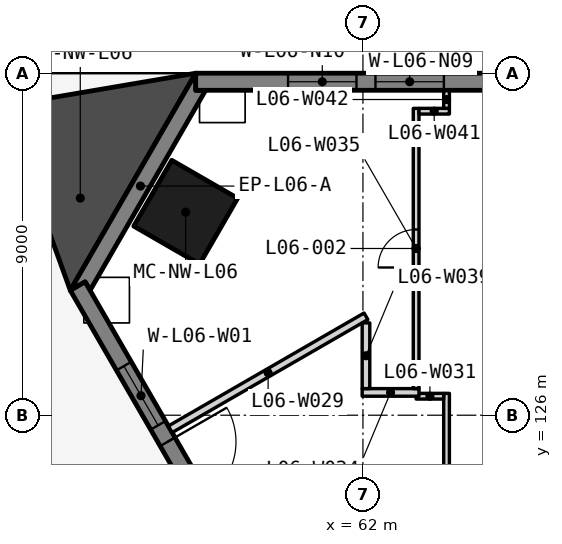
"""IFC4 building model, lengths in metres.
Left out: names, types, materials, properties, quantities, classifications, styles, units other than length and angle.
Written with IfcOpenShell. Run it as: python <this file> out.ifc"""

import sys

from ifc_helpers import new_model, si_unit, direction, frame, frame_2d, origin, origin_2d, place, context, subcontext, project, spatial, polyline, rectangle, outline, extrude, element, fill, save


model = new_model("IFC4")
c1 = context("Model", 3, precision=1e-05, world=origin(), true_north=direction((0.0, 1.0)))
c2 = subcontext(c1, "Body", "Model", "MODEL_VIEW")
j1 = project(units=[si_unit("LENGTHUNIT", "METRE"), si_unit("PLANEANGLEUNIT", "RADIAN")], contexts=[c1])
p1 = place(None, origin())
s1 = spatial("IfcSite", under=j1, at=p1, CompositionType="ELEMENT")
p2 = place(p1, origin())
s2 = spatial("IfcBuilding", under=s1, at=p2, CompositionType="ELEMENT")
p3 = place(p2, frame((0.0, 0.0, 35.0)))
s3 = spatial("IfcBuildingStorey", under=s2, at=p3, CompositionType="ELEMENT", Elevation=35.0)
p4 = place(p3, frame((57.336, 131.342, 0.0), z_axis=(0.0, 0.0, 1.0), x_axis=(-0.5, -0.866025403784, 0.0)))
e1 = element("IfcColumn", 1, at=p4, inside=s3, PredefinedType="COLUMN", context=c2, shape_type="SweptSolid", body=[
    extrude(rectangle(XDim=2.0, YDim=2.0, at=origin_2d()), origin(), (0.0, 0.0, 1.0), 3.5),
])
p5 = place(p3, frame((0.0, 0.0, -0.2)))
e2 = element("IfcWall", 2, at=p5, inside=s3, PredefinedType="SOLIDWALL", context=c2, shape_type="SweptSolid", body=[
    extrude(outline(polyline([(57.6, 135.0), (57.6, 134.55), (57.86, 134.55), (54.82, 129.284), (54.69, 129.509), (54.3, 129.284), (57.6, 135.0)])), origin(), (0.0, 0.0, 1.0), 3.55),
])
p6 = place(p3, frame((102.4, 134.775, -0.2), z_axis=(0.0, 0.0, 1.0), x_axis=(-1.0, 0.0, 0.0)))
e3 = element("IfcWall", 3, at=p6, inside=s3, PredefinedType="SOLIDWALL", context=c2, shape_type="SweptSolid", body=[
    extrude(outline(polyline([(44.8, 0.0), (44.8, 3.55), (0.0, 3.55), (0.0, 0.0), (44.8, 0.0)])), frame((0.0, 0.225, 0.0), z_axis=(0.0, -1.0, 0.0), x_axis=(1.0, 0.0, 0.0)), (0.0, 0.0, 1.0), 0.45),
])
p7 = place(p6, frame((2.43, 0.0, 1.1)))
e4 = element("IfcOpeningElement", 4, at=p7, cuts=e3, PredefinedType="OPENING", context=c2, shape_type="SweptSolid", body=[
    extrude(rectangle(XDim=1.8, YDim=1.5, at=frame_2d((0.9, 0.75))), frame((0.0, 0.235, 0.0), z_axis=(0.0, -1.0, 0.0), x_axis=(1.0, 0.0, 0.0)), (0.0, 0.0, 1.0), 0.47),
])
p8 = place(p6, frame((4.73, 0.0, 1.1)))
e5 = element("IfcOpeningElement", 5, at=p8, cuts=e3, PredefinedType="OPENING", context=c2, shape_type="SweptSolid", body=[
    extrude(rectangle(XDim=1.8, YDim=1.5, at=frame_2d((0.9, 0.75))), frame((0.0, 0.235, 0.0), z_axis=(0.0, -1.0, 0.0), x_axis=(1.0, 0.0, 0.0)), (0.0, 0.0, 1.0), 0.47),
])
p9 = place(p6, frame((11.39, 0.0, 1.1)))
e6 = element("IfcOpeningElement", 6, at=p9, cuts=e3, PredefinedType="OPENING", context=c2, shape_type="SweptSolid", body=[
    extrude(rectangle(XDim=1.8, YDim=1.5, at=frame_2d((0.9, 0.75))), frame((0.0, 0.235, 0.0), z_axis=(0.0, -1.0, 0.0), x_axis=(1.0, 0.0, 0.0)), (0.0, 0.0, 1.0), 0.47),
])
p10 = place(p6, frame((13.69, 0.0, 1.1)))
e7 = element("IfcOpeningElement", 7, at=p10, cuts=e3, PredefinedType="OPENING", context=c2, shape_type="SweptSolid", body=[
    extrude(rectangle(XDim=1.8, YDim=1.5, at=frame_2d((0.9, 0.75))), frame((0.0, 0.235, 0.0), z_axis=(0.0, -1.0, 0.0), x_axis=(1.0, 0.0, 0.0)), (0.0, 0.0, 1.0), 0.47),
])
p11 = place(p6, frame((20.35, 0.0, 1.1)))
e8 = element("IfcOpeningElement", 8, at=p11, cuts=e3, PredefinedType="OPENING", context=c2, shape_type="SweptSolid", body=[
    extrude(rectangle(XDim=1.8, YDim=1.5, at=frame_2d((0.9, 0.75))), frame((0.0, 0.235, 0.0), z_axis=(0.0, -1.0, 0.0), x_axis=(1.0, 0.0, 0.0)), (0.0, 0.0, 1.0), 0.47),
])
p12 = place(p6, frame((22.65, 0.0, 1.1)))
e9 = element("IfcOpeningElement", 9, at=p12, cuts=e3, PredefinedType="OPENING", context=c2, shape_type="SweptSolid", body=[
    extrude(rectangle(XDim=1.8, YDim=1.5, at=frame_2d((0.9, 0.75))), frame((0.0, 0.235, 0.0), z_axis=(0.0, -1.0, 0.0), x_axis=(1.0, 0.0, 0.0)), (0.0, 0.0, 1.0), 0.47),
])
p13 = place(p6, frame((29.31, 0.0, 1.1)))
e10 = element("IfcOpeningElement", 10, at=p13, cuts=e3, PredefinedType="OPENING", context=c2, shape_type="SweptSolid", body=[
    extrude(rectangle(XDim=1.8, YDim=1.5, at=frame_2d((0.9, 0.75))), frame((0.0, 0.235, 0.0), z_axis=(0.0, -1.0, 0.0), x_axis=(1.0, 0.0, 0.0)), (0.0, 0.0, 1.0), 0.47),
])
p14 = place(p6, frame((31.61, 0.0, 1.1)))
e11 = element("IfcOpeningElement", 11, at=p14, cuts=e3, PredefinedType="OPENING", context=c2, shape_type="SweptSolid", body=[
    extrude(rectangle(XDim=1.8, YDim=1.5, at=frame_2d((0.9, 0.75))), frame((0.0, 0.235, 0.0), z_axis=(0.0, -1.0, 0.0), x_axis=(1.0, 0.0, 0.0)), (0.0, 0.0, 1.0), 0.47),
])
p15 = place(p6, frame((38.27, 0.0, 1.1)))
e12 = element("IfcOpeningElement", 12, at=p15, cuts=e3, PredefinedType="OPENING", context=c2, shape_type="SweptSolid", body=[
    extrude(rectangle(XDim=1.8, YDim=1.5, at=frame_2d((0.9, 0.75))), frame((0.0, 0.235, 0.0), z_axis=(0.0, -1.0, 0.0), x_axis=(1.0, 0.0, 0.0)), (0.0, 0.0, 1.0), 0.47),
])
p16 = place(p6, frame((40.57, 0.0, 1.1)))
e13 = element("IfcOpeningElement", 13, at=p16, cuts=e3, PredefinedType="OPENING", context=c2, shape_type="SweptSolid", body=[
    extrude(rectangle(XDim=1.8, YDim=1.5, at=frame_2d((0.9, 0.75))), frame((0.0, 0.235, 0.0), z_axis=(0.0, -1.0, 0.0), x_axis=(1.0, 0.0, 0.0)), (0.0, 0.0, 1.0), 0.47),
])
p17 = place(p3, frame((54.495, 129.397, -0.2), z_axis=(0.0, 0.0, 1.0), x_axis=(0.499999201451, -0.866025864826, 0.0)))
e14 = element("IfcWall", 14, at=p17, inside=s3, PredefinedType="SOLIDWALL", context=c2, shape_type="SweptSolid", body=[
    extrude(outline(polyline([(44.8, 0.0), (44.8, 3.55), (0.0, 3.55), (0.0, 0.0), (44.8, 0.0)])), frame((0.0, 0.225, 0.0), z_axis=(0.0, -1.0, 0.0), x_axis=(1.0, 0.0, 0.0)), (0.0, 0.0, 1.0), 0.45),
])
p18 = place(p17, frame((2.43, 0.0, 1.1)))
e15 = element("IfcOpeningElement", 15, at=p18, cuts=e14, PredefinedType="OPENING", context=c2, shape_type="SweptSolid", body=[
    extrude(rectangle(XDim=1.8, YDim=1.5, at=frame_2d((0.9, 0.75))), frame((0.0, 0.235, 0.0), z_axis=(0.0, -1.0, 0.0), x_axis=(1.0, 0.0, 0.0)), (0.0, 0.0, 1.0), 0.47),
])
p19 = place(p17, frame((4.73, 0.0, 0.2)))
e16 = element("IfcOpeningElement", 16, at=p19, cuts=e14, PredefinedType="OPENING", context=c2, shape_type="SweptSolid", body=[
    extrude(rectangle(XDim=1.8, YDim=2.4, at=frame_2d((0.9, 1.2))), frame((0.0, 0.235, 0.0), z_axis=(0.0, -1.0, 0.0), x_axis=(1.0, 0.0, 0.0)), (0.0, 0.0, 1.0), 0.47),
])
p20 = place(p17, frame((11.39, 0.0, 1.1)))
e17 = element("IfcOpeningElement", 17, at=p20, cuts=e14, PredefinedType="OPENING", context=c2, shape_type="SweptSolid", body=[
    extrude(rectangle(XDim=1.8, YDim=1.5, at=frame_2d((0.9, 0.75))), frame((0.0, 0.235, 0.0), z_axis=(0.0, -1.0, 0.0), x_axis=(1.0, 0.0, 0.0)), (0.0, 0.0, 1.0), 0.47),
])
p21 = place(p17, frame((13.69, 0.0, 1.1)))
e18 = element("IfcOpeningElement", 18, at=p21, cuts=e14, PredefinedType="OPENING", context=c2, shape_type="SweptSolid", body=[
    extrude(rectangle(XDim=1.8, YDim=1.5, at=frame_2d((0.9, 0.75))), frame((0.0, 0.235, 0.0), z_axis=(0.0, -1.0, 0.0), x_axis=(1.0, 0.0, 0.0)), (0.0, 0.0, 1.0), 0.47),
])
p22 = place(p17, frame((20.35, 0.0, 0.2)))
e19 = element("IfcOpeningElement", 19, at=p22, cuts=e14, PredefinedType="OPENING", context=c2, shape_type="SweptSolid", body=[
    extrude(rectangle(XDim=1.8, YDim=2.4, at=frame_2d((0.9, 1.2))), frame((0.0, 0.235, 0.0), z_axis=(0.0, -1.0, 0.0), x_axis=(1.0, 0.0, 0.0)), (0.0, 0.0, 1.0), 0.47),
])
p23 = place(p17, frame((22.65, 0.0, 1.1)))
e20 = element("IfcOpeningElement", 20, at=p23, cuts=e14, PredefinedType="OPENING", context=c2, shape_type="SweptSolid", body=[
    extrude(rectangle(XDim=1.8, YDim=1.5, at=frame_2d((0.9, 0.75))), frame((0.0, 0.235, 0.0), z_axis=(0.0, -1.0, 0.0), x_axis=(1.0, 0.0, 0.0)), (0.0, 0.0, 1.0), 0.47),
])
p24 = place(p17, frame((29.31, 0.0, 1.1)))
e21 = element("IfcOpeningElement", 21, at=p24, cuts=e14, PredefinedType="OPENING", context=c2, shape_type="SweptSolid", body=[
    extrude(rectangle(XDim=1.8, YDim=1.5, at=frame_2d((0.9, 0.75))), frame((0.0, 0.235, 0.0), z_axis=(0.0, -1.0, 0.0), x_axis=(1.0, 0.0, 0.0)), (0.0, 0.0, 1.0), 0.47),
])
p25 = place(p17, frame((31.61, 0.0, 0.2)))
e22 = element("IfcOpeningElement", 22, at=p25, cuts=e14, PredefinedType="OPENING", context=c2, shape_type="SweptSolid", body=[
    extrude(rectangle(XDim=1.8, YDim=2.4, at=frame_2d((0.9, 1.2))), frame((0.0, 0.235, 0.0), z_axis=(0.0, -1.0, 0.0), x_axis=(1.0, 0.0, 0.0)), (0.0, 0.0, 1.0), 0.47),
])
p26 = place(p17, frame((38.27, 0.0, 1.1)))
e23 = element("IfcOpeningElement", 23, at=p26, cuts=e14, PredefinedType="OPENING", context=c2, shape_type="SweptSolid", body=[
    extrude(rectangle(XDim=1.8, YDim=1.5, at=frame_2d((0.9, 0.75))), frame((0.0, 0.235, 0.0), z_axis=(0.0, -1.0, 0.0), x_axis=(1.0, 0.0, 0.0)), (0.0, 0.0, 1.0), 0.47),
])
p27 = place(p17, frame((40.57, 0.0, 1.1)))
e24 = element("IfcOpeningElement", 24, at=p27, cuts=e14, PredefinedType="OPENING", context=c2, shape_type="SweptSolid", body=[
    extrude(rectangle(XDim=1.8, YDim=1.5, at=frame_2d((0.9, 0.75))), frame((0.0, 0.235, 0.0), z_axis=(0.0, -1.0, 0.0), x_axis=(1.0, 0.0, 0.0)), (0.0, 0.0, 1.0), 0.47),
])
p28 = place(p3, frame((77.166, 81.679, 0.0), z_axis=(0.0, 0.0, 1.0), x_axis=(-0.500001932243, 0.8660242882, 0.0)))
e25 = element("IfcWall", 25, at=p28, inside=s3, PredefinedType="STANDARD", context=c2, shape_type="SweptSolid", body=[
    extrude(rectangle(XDim=54.747, YDim=1.0, at=frame_2d((27.374, 0.0))), origin(), (0.0, 0.0, 1.0), 0.6),
])
p29 = place(p3, frame((0.0, 0.0, 0.04)))
e26 = element("IfcWall", 26, at=p29, inside=s3, PredefinedType="SOLIDWALL", context=c2, shape_type="SweptSolid", body=[
    extrude(outline(polyline([(57.6, 135.0), (52.545, 134.141), (54.3, 129.284), (57.6, 135.0)])), origin(), (0.0, 0.0, 1.0), 3.31),
])
p30 = place(p3, frame((64.2, 117.675, 0.0), z_axis=(0.0, 0.0, 1.0), x_axis=(0.0, 1.0, 0.0)))
e27 = element("IfcWall", 27, at=p30, inside=s3, PredefinedType="PARTITIONING", context=c2, shape_type="SweptSolid", body=[
    extrude(rectangle(XDim=8.9, YDim=0.15, at=frame_2d((4.45, 0.0))), origin(), (0.0, 0.0, 1.0), 3.35),
])
p31 = place(p30, frame((3.95, 0.0, 0.0)))
e28 = element("IfcOpeningElement", 28, at=p31, cuts=e27, PredefinedType="OPENING", context=c2, shape_type="SweptSolid", body=[
    extrude(rectangle(XDim=1.0, YDim=2.1, at=frame_2d((0.5, 1.05))), frame((0.0, 0.085, 0.0), z_axis=(0.0, -1.0, 0.0), x_axis=(1.0, 0.0, 0.0)), (0.0, 0.0, 1.0), 0.17),
])
p32 = place(p3, frame((56.93, 125.629, 0.0), z_axis=(0.0, 0.0, 1.0), x_axis=(0.866021515814, 0.500006734102, 0.0)))
e29 = element("IfcWall", 29, at=p32, inside=s3, PredefinedType="PARTITIONING", context=c2, shape_type="SweptSolid", body=[
    extrude(rectangle(XDim=5.947, YDim=0.2, at=frame_2d((2.974, 0.0))), origin(), (0.0, 0.0, 1.0), 3.35),
])
p33 = place(p3, frame((63.4, 126.5, 0.0), z_axis=(0.0, 0.0, 1.0), x_axis=(1.0, 0.0, 0.0)))
e30 = element("IfcWall", 30, at=p33, inside=s3, PredefinedType="PARTITIONING", context=c2, shape_type="SweptSolid", body=[
    extrude(rectangle(XDim=0.725, YDim=0.15, at=frame_2d((0.363, 0.0))), origin(), (0.0, 0.0, 1.0), 3.35),
])
p34 = place(p3, frame((61.98, 126.6, 0.0), z_axis=(0.0, 0.0, 1.0), x_axis=(1.0, 0.0, 0.0)))
e31 = element("IfcWall", 31, at=p34, inside=s3, PredefinedType="PARTITIONING", context=c2, shape_type="SweptSolid", body=[
    extrude(rectangle(XDim=1.495, YDim=0.2, at=frame_2d((0.748, 0.0))), origin(), (0.0, 0.0, 1.0), 3.35),
])
p35 = place(p3, frame((63.4, 126.7, 0.0), z_axis=(0.0, 0.0, 1.0), x_axis=(0.0, 1.0, 0.0)))
e32 = element("IfcWall", 32, at=p35, inside=s3, PredefinedType="PARTITIONING", context=c2, shape_type="SweptSolid", body=[
    extrude(rectangle(XDim=7.375, YDim=0.15, at=frame_2d((3.687, 0.0))), origin(), (0.0, 0.0, 1.0), 3.35),
])
p36 = place(p35, frame((3.187, 0.0, 0.0)))
e33 = element("IfcOpeningElement", 33, at=p36, cuts=e32, PredefinedType="OPENING", context=c2, shape_type="SweptSolid", body=[
    extrude(rectangle(XDim=1.0, YDim=2.1, at=frame_2d((0.5, 1.05))), frame((0.0, 0.085, 0.0), z_axis=(0.0, -1.0, 0.0), x_axis=(1.0, 0.0, 0.0)), (0.0, 0.0, 1.0), 0.17),
])
p37 = place(p3, frame((62.08, 126.7, 0.0), z_axis=(0.0, 0.0, 1.0), x_axis=(0.0, 1.0, 0.0)))
e34 = element("IfcWall", 34, at=p37, inside=s3, PredefinedType="PARTITIONING", context=c2, shape_type="SweptSolid", body=[
    extrude(rectangle(XDim=1.73, YDim=0.2, at=frame_2d((0.865, 0.0))), origin(), (0.0, 0.0, 1.0), 3.35),
])
p38 = place(p3, frame((63.475, 134.0, 0.0), z_axis=(0.0, 0.0, 1.0), x_axis=(0.999999813645, 0.000610500497, 0.0)))
e35 = element("IfcWall", 35, at=p38, inside=s3, PredefinedType="PARTITIONING", context=c2, shape_type="SweptSolid", body=[
    extrude(rectangle(XDim=0.8, YDim=0.15, at=frame_2d((0.4, 0.0))), origin(), (0.0, 0.0, 1.0), 2.887),
])
p39 = place(p3, frame((64.2, 134.075, 0.0), z_axis=(0.0, 0.0, 1.0), x_axis=(0.0, 1.0, 0.0)))
e36 = element("IfcWall", 36, at=p39, inside=s3, PredefinedType="PARTITIONING", context=c2, shape_type="SweptSolid", body=[
    extrude(rectangle(XDim=0.465, YDim=0.15, at=frame_2d((0.232, 0.0))), origin(), (0.0, 0.0, 1.0), 3.35),
])
p40 = place(p15, origin())
e37 = element("IfcWindow", 37, at=p40, inside=s3, PartitioningType="SINGLE_PANEL", PredefinedType="WINDOW", context=c2, shape_type="SweptSolid", body=[
    extrude(rectangle(XDim=1.8, YDim=1.5, at=frame_2d((0.9, 0.75))), frame((0.0, 0.03, 0.0), z_axis=(0.0, -1.0, 0.0), x_axis=(1.0, 0.0, 0.0)), (0.0, 0.0, 1.0), 0.06),
])
fill(e12, e37)
p41 = place(p16, origin())
e38 = element("IfcWindow", 38, at=p41, inside=s3, PartitioningType="SINGLE_PANEL", PredefinedType="WINDOW", context=c2, shape_type="SweptSolid", body=[
    extrude(rectangle(XDim=1.8, YDim=1.5, at=frame_2d((0.9, 0.75))), frame((0.0, 0.03, 0.0), z_axis=(0.0, -1.0, 0.0), x_axis=(1.0, 0.0, 0.0)), (0.0, 0.0, 1.0), 0.06),
])
fill(e13, e38)
p42 = place(p18, origin())
e39 = element("IfcWindow", 39, at=p42, inside=s3, PartitioningType="SINGLE_PANEL", PredefinedType="WINDOW", context=c2, shape_type="SweptSolid", body=[
    extrude(rectangle(XDim=1.8, YDim=1.5, at=frame_2d((0.9, 0.75))), frame((0.0, 0.03, 0.0), z_axis=(0.0, -1.0, 0.0), x_axis=(1.0, 0.0, 0.0)), (0.0, 0.0, 1.0), 0.06),
])
fill(e15, e39)
p43 = place(p19, origin())
e40 = element("IfcDoor", 40, at=p43, inside=s3, OperationType="SINGLE_SWING_LEFT", PredefinedType="DOOR", context=c2, shape_type="SweptSolid", body=[
    extrude(rectangle(XDim=1.8, YDim=2.4, at=frame_2d((0.9, 1.2))), frame((0.0, 0.025, 0.0), z_axis=(0.0, -1.0, 0.0), x_axis=(1.0, 0.0, 0.0)), (0.0, 0.0, 1.0), 0.05),
])
fill(e16, e40)
p44 = place(p36, origin())
e41 = element("IfcDoor", 41, at=p44, inside=s3, OperationType="SINGLE_SWING_LEFT", PredefinedType="DOOR", context=c2, shape_type="SweptSolid", body=[
    extrude(rectangle(XDim=1.0, YDim=2.1, at=frame_2d((0.5, 1.05))), frame((0.0, 0.025, 0.0), z_axis=(0.0, -1.0, 0.0), x_axis=(1.0, 0.0, 0.0)), (0.0, 0.0, 1.0), 0.05),
])
fill(e33, e41)
save(model, sys.argv[1])
